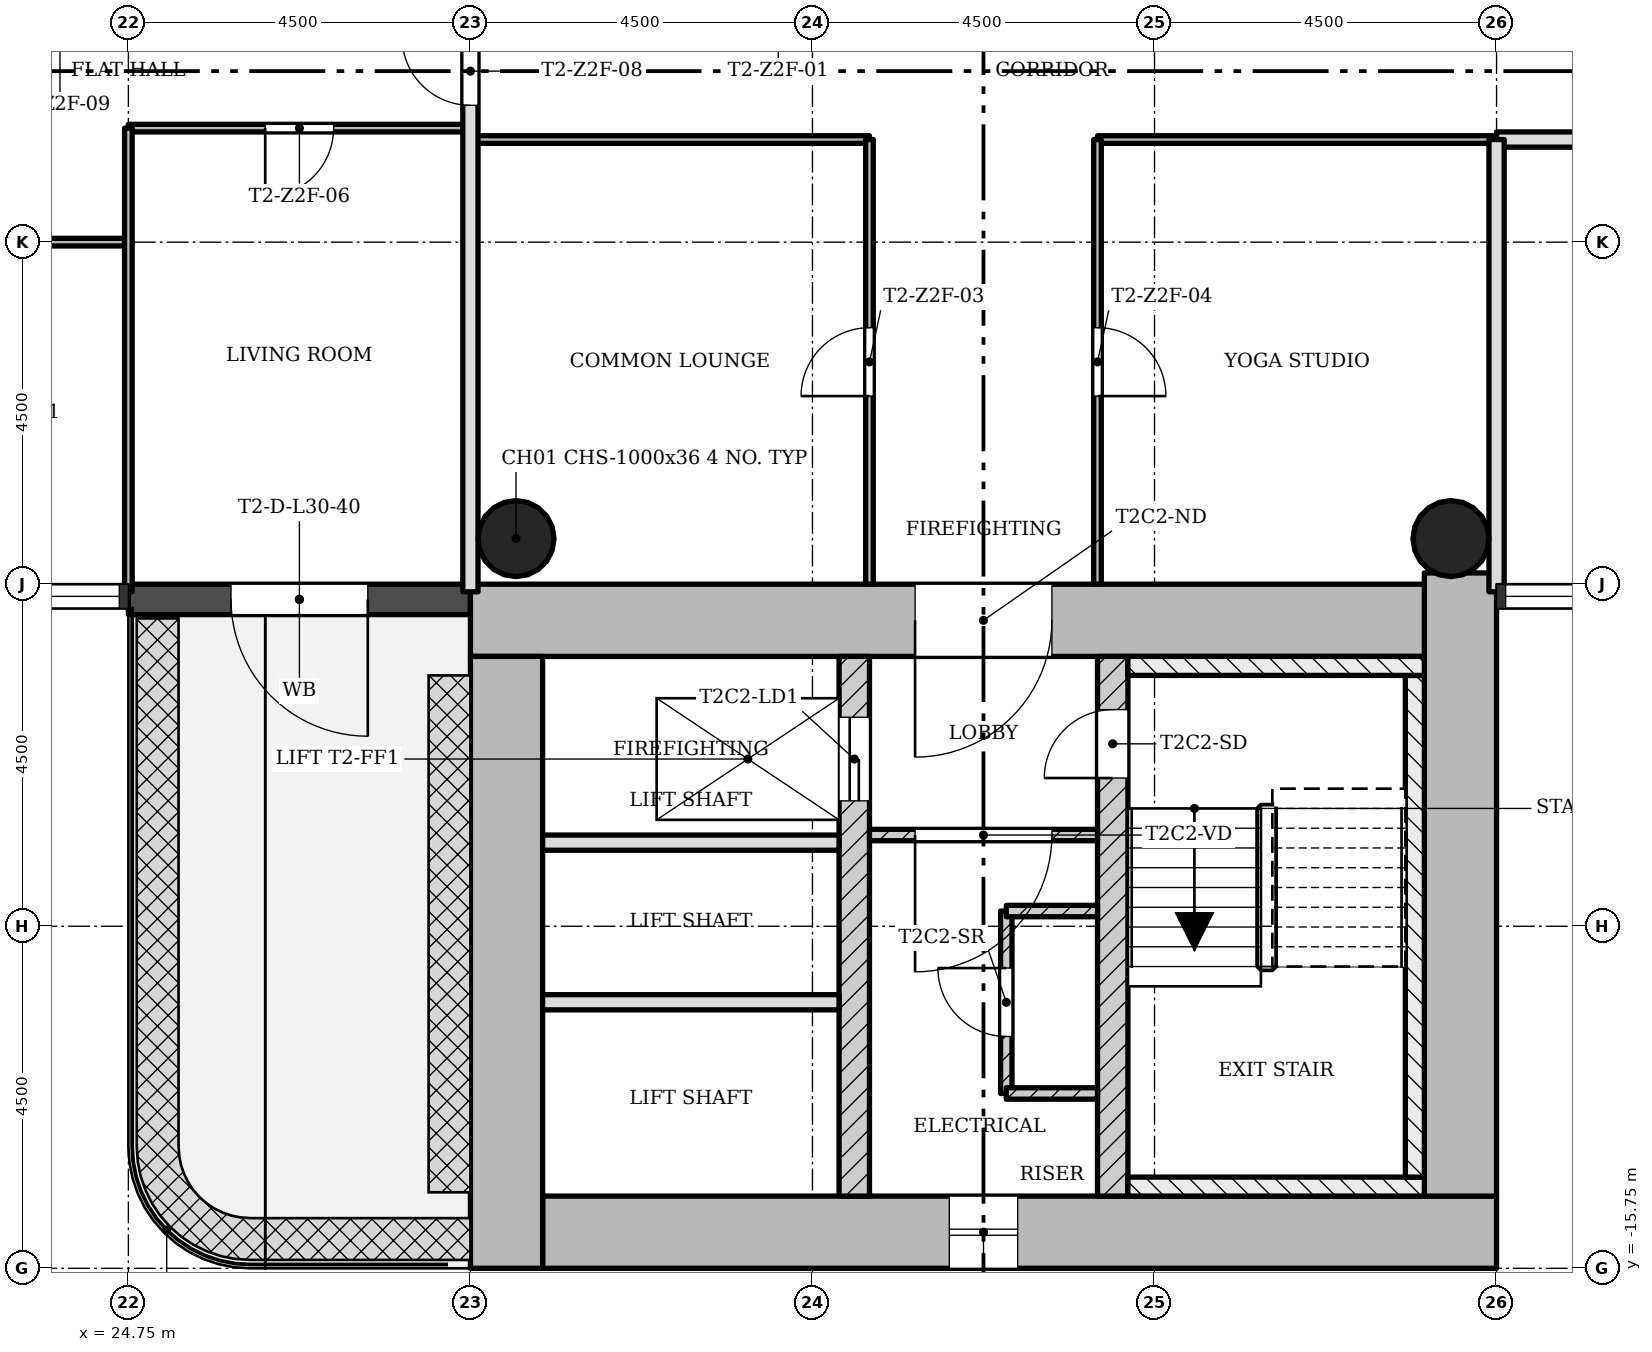
"""IFC4 building model, lengths in metres.
Left out: names, types, materials, properties, quantities, classifications, styles, units other than length and angle.
Written with IfcOpenShell. Run it as: python <this file> out.ifc"""

import sys

from ifc_helpers import new_model, si_unit, direction, frame, frame_2d, origin, origin_2d, place, context, subcontext, project, spatial, rectangle, hollow_circle, extrude, element, fill, save


model = new_model("IFC4")
c1 = context("Model", 3, precision=1e-05, world=origin(), true_north=direction((0.0, 1.0)))
c2 = subcontext(c1, "Body", "Model", "MODEL_VIEW")
j1 = project(units=[si_unit("LENGTHUNIT", "METRE"), si_unit("PLANEANGLEUNIT", "RADIAN")], contexts=[c1])
p1 = place(None, origin())
s1 = spatial("IfcSite", under=j1, at=p1, CompositionType="ELEMENT")
p2 = place(p1, origin())
s2 = spatial("IfcBuilding", under=s1, at=p2, CompositionType="ELEMENT")
p3 = place(p2, frame((0.0, 0.0, 110.6)))
s3 = spatial("IfcBuildingStorey", under=s2, at=p3, CompositionType="ELEMENT", Elevation=110.6)
p4 = place(p3, frame((30.2, -15.275, 0.0), z_axis=(0.0, 0.0, 1.0), x_axis=(1.0, 0.0, 0.0)))
e1 = element("IfcWall", 1, at=p4, inside=s3, PredefinedType="SHEAR", context=c2, shape_type="SweptSolid", body=[
    extrude(rectangle(XDim=12.55, YDim=0.95, at=frame_2d((6.275, 0.0))), origin(), (0.0, 0.0, 1.0), 3.4),
])
p5 = place(p4, frame((5.35, 0.0, 0.45)))
e2 = element("IfcOpeningElement", 2, at=p5, cuts=e1, PredefinedType="OPENING", context=c2, shape_type="SweptSolid", body=[
    extrude(rectangle(XDim=0.9, YDim=2.4, at=frame_2d((0.45, 1.2))), frame((0.0, 0.485, 0.0), z_axis=(0.0, -1.0, 0.0), x_axis=(1.0, 0.0, 0.0)), (0.0, 0.0, 1.0), 0.97),
])
p6 = place(p3, frame((42.275, -14.8, 0.0), z_axis=(0.0, 0.0, 1.0), x_axis=(0.0, 1.0, 0.0)))
e3 = element("IfcWall", 3, at=p6, inside=s3, PredefinedType="SHEAR", context=c2, shape_type="SweptSolid", body=[
    extrude(rectangle(XDim=8.198, YDim=0.95, at=frame_2d((4.099, 0.0))), origin(), (0.0, 0.0, 1.0), 3.4),
])
p7 = place(p3, frame((41.8, -7.225, 0.0), z_axis=(0.0, 0.0, 1.0), x_axis=(-1.0, 0.0, 0.0)))
e4 = element("IfcWall", 4, at=p7, inside=s3, PredefinedType="SHEAR", context=c2, shape_type="SweptSolid", body=[
    extrude(rectangle(XDim=12.55, YDim=0.95, at=frame_2d((6.275, 0.0))), origin(), (0.0, 0.0, 1.0), 3.4),
])
p8 = place(p7, frame((4.9, 0.0, 0.0)))
e5 = element("IfcOpeningElement", 5, at=p8, cuts=e4, PredefinedType="OPENING", context=c2, shape_type="SweptSolid", body=[
    extrude(rectangle(XDim=1.8, YDim=2.1, at=frame_2d((0.9, 1.05))), frame((0.0, 0.485, 0.0), z_axis=(0.0, -1.0, 0.0), x_axis=(1.0, 0.0, 0.0)), (0.0, 0.0, 1.0), 0.97),
])
p9 = place(p3, frame((29.725, -7.7, 0.0), z_axis=(0.0, 0.0, 1.0), x_axis=(0.0, -1.0, 0.0)))
e6 = element("IfcWall", 6, at=p9, inside=s3, PredefinedType="SHEAR", context=c2, shape_type="SweptSolid", body=[
    extrude(rectangle(XDim=8.05, YDim=0.95, at=frame_2d((4.025, 0.0))), origin(), (0.0, 0.0, 1.0), 3.4),
])
p10 = place(p3, frame((34.3, -14.8, 0.0), z_axis=(0.0, 0.0, 1.0), x_axis=(0.0, 1.0, 0.0)))
e7 = element("IfcWall", 7, at=p10, inside=s3, PredefinedType="SHEAR", context=c2, shape_type="SweptSolid", body=[
    extrude(rectangle(XDim=7.1, YDim=0.4, at=frame_2d((3.55, 0.0))), origin(), (0.0, 0.0, 1.0), 3.4),
])
p11 = place(p10, frame((5.2, 0.0, 0.0)))
e8 = element("IfcOpeningElement", 8, at=p11, cuts=e7, PredefinedType="OPENING", context=c2, shape_type="SweptSolid", body=[
    extrude(rectangle(XDim=1.1, YDim=2.1, at=frame_2d((0.55, 1.05))), frame((0.0, 0.21, 0.0), z_axis=(0.0, -1.0, 0.0), x_axis=(1.0, 0.0, 0.0)), (0.0, 0.0, 1.0), 0.42),
])
p12 = place(p3, frame((37.7, -14.8, 0.0), z_axis=(0.0, 0.0, 1.0), x_axis=(0.0, 1.0, 0.0)))
e9 = element("IfcWall", 9, at=p12, inside=s3, PredefinedType="SHEAR", context=c2, shape_type="SweptSolid", body=[
    extrude(rectangle(XDim=7.1, YDim=0.4, at=frame_2d((3.55, 0.0))), origin(), (0.0, 0.0, 1.0), 3.4),
])
p13 = place(p12, frame((5.5, 0.0, 0.0)))
e10 = element("IfcOpeningElement", 10, at=p13, cuts=e9, PredefinedType="OPENING", context=c2, shape_type="SweptSolid", body=[
    extrude(rectangle(XDim=0.9, YDim=2.1, at=frame_2d((0.45, 1.05))), frame((0.0, 0.21, 0.0), z_axis=(0.0, -1.0, 0.0), x_axis=(1.0, 0.0, 0.0)), (0.0, 0.0, 1.0), 0.42),
])
for number, where, z_axis, x_axis in (
    (11, (42.15, -6.15, 0.0), (0.0, 0.0, 1.0), (1.0, 0.0, 0.0)),
    (12, (29.85, -6.15, 0.0), (0.0, 0.0, 1.0), (1.0, 0.0, 0.0)),
):
    element("IfcColumn", number, at=place(p3, frame(where, z_axis=z_axis, x_axis=x_axis)), inside=s3, PredefinedType="COLUMN", context=c2, shape_type="SweptSolid", body=[
        extrude(hollow_circle(Radius=0.5, WallThickness=0.036, at=origin_2d()), origin(), (0.0, 0.0, 1.0), 3.4),
    ])
p14 = place(p3, frame((24.75, -6.95, -0.02), z_axis=(0.0, 0.0, 1.0), x_axis=(1.0, 0.0, 0.0)))
e13 = element("IfcWall", 13, at=p14, inside=s3, PredefinedType="STANDARD", context=c2, shape_type="SweptSolid", body=[
    extrude(rectangle(XDim=4.5, YDim=0.4, at=frame_2d((2.25, 0.0))), origin(), (0.0, 0.0, 1.0), 3.12),
])
p15 = place(p14, frame((1.35, 0.0, 0.02)))
e14 = element("IfcOpeningElement", 14, at=p15, cuts=e13, PredefinedType="OPENING", context=c2, shape_type="SweptSolid", body=[
    extrude(rectangle(XDim=1.8, YDim=2.1, at=frame_2d((0.9, 1.05))), frame((0.0, 0.21, 0.0), z_axis=(0.0, -1.0, 0.0), x_axis=(1.0, 0.0, 0.0)), (0.0, 0.0, 1.0), 0.42),
])
p16 = place(p3, frame((34.5, -10.05, 0.0), z_axis=(0.0, 0.0, 1.0), x_axis=(1.0, 0.0, 0.0)))
e15 = element("IfcWall", 15, at=p16, inside=s3, PredefinedType="PARTITIONING", context=c2, shape_type="SweptSolid", body=[
    extrude(rectangle(XDim=3.0, YDim=0.15, at=frame_2d((1.5, 0.0))), origin(), (0.0, 0.0, 1.0), 3.0),
])
p17 = place(p16, frame((0.6, 0.0, 0.0)))
e16 = element("IfcOpeningElement", 16, at=p17, cuts=e15, PredefinedType="OPENING", context=c2, shape_type="SweptSolid", body=[
    extrude(rectangle(XDim=1.8, YDim=2.1, at=frame_2d((0.9, 1.05))), frame((0.0, 0.085, 0.0), z_axis=(0.0, -1.0, 0.0), x_axis=(1.0, 0.0, 0.0)), (0.0, 0.0, 1.0), 0.17),
])
for number, where, z_axis, x_axis in (
    (17, (30.2, -10.15, 0.0), (0.0, 0.0, 1.0), (1.0, 0.0, 0.0)),
    (18, (30.2, -12.25, 0.0), (0.0, 0.0, 1.0), (1.0, 0.0, 0.0)),
):
    element("IfcWall", number, at=place(p3, frame(where, z_axis=z_axis, x_axis=x_axis)), inside=s3, PredefinedType="SOLIDWALL", context=c2, shape_type="SweptSolid", body=[
        extrude(rectangle(XDim=3.9, YDim=0.2, at=frame_2d((1.95, 0.0))), origin(), (0.0, 0.0, 1.0), 3.0),
    ])
p18 = place(p3, frame((36.3, -11.05, 0.0), z_axis=(0.0, 0.0, 1.0), x_axis=(0.0, -1.0, 0.0)))
e19 = element("IfcWall", 19, at=p18, inside=s3, PredefinedType="PARTITIONING", context=c2, shape_type="SweptSolid", body=[
    extrude(rectangle(XDim=2.4, YDim=0.15, at=frame_2d((1.2, 0.0))), origin(), (0.0, 0.0, 1.0), 3.0),
])
p19 = place(p18, frame((0.75, 0.0, 0.0)))
e20 = element("IfcOpeningElement", 20, at=p19, cuts=e19, PredefinedType="OPENING", context=c2, shape_type="SweptSolid", body=[
    extrude(rectangle(XDim=0.9, YDim=2.1, at=frame_2d((0.45, 1.05))), frame((0.0, 0.085, 0.0), z_axis=(0.0, -1.0, 0.0), x_axis=(1.0, 0.0, 0.0)), (0.0, 0.0, 1.0), 0.17),
])
for number, where, z_axis, x_axis in (
    (21, (36.3, -11.05, 0.0), (0.0, 0.0, 1.0), (1.0, 0.0, 0.0)),
    (22, (36.3, -13.45, 0.0), (0.0, 0.0, 1.0), (1.0, 0.0, 0.0)),
):
    element("IfcWall", number, at=place(p3, frame(where, z_axis=z_axis, x_axis=x_axis)), inside=s3, PredefinedType="PARTITIONING", context=c2, shape_type="SweptSolid", body=[
        extrude(rectangle(XDim=1.2, YDim=0.15, at=frame_2d((0.6, 0.0))), origin(), (0.0, 0.0, 1.0), 3.0),
    ])
p20 = place(p3, frame((24.75, -2.25, 0.0), z_axis=(0.0, 0.0, 1.0), x_axis=(-1.0, 0.0, 0.0)))
e23 = element("IfcWall", 23, at=p20, inside=s3, PredefinedType="PARTITIONING", context=c2, shape_type="SweptSolid", body=[
    extrude(rectangle(XDim=9.1, YDim=0.1, at=frame_2d((4.55, 0.0))), origin(), (0.0, 0.0, 1.0), 3.0),
])
p21 = place(p20, frame((3.45, 0.0, 0.0)))
e24 = element("IfcOpeningElement", 24, at=p21, cuts=e23, PredefinedType="OPENING", context=c2, shape_type="SweptSolid", body=[
    extrude(rectangle(XDim=0.9, YDim=2.1, at=frame_2d((0.45, 1.05))), frame((0.0, 0.06, 0.0), z_axis=(0.0, -1.0, 0.0), x_axis=(1.0, 0.0, 0.0)), (0.0, 0.0, 1.0), 0.12),
])
p22 = place(p20, frame((5.55, 0.0, 0.0)))
e25 = element("IfcOpeningElement", 25, at=p22, cuts=e23, PredefinedType="OPENING", context=c2, shape_type="SweptSolid", body=[
    extrude(rectangle(XDim=0.9, YDim=2.1, at=frame_2d((0.45, 1.05))), frame((0.0, 0.06, 0.0), z_axis=(0.0, -1.0, 0.0), x_axis=(1.0, 0.0, 0.0)), (0.0, 0.0, 1.0), 0.12),
])
for number, where, z_axis, x_axis in (
    (26, (42.75, -0.9, 0.0), (0.0, 0.0, 1.0), (-1.0, 0.0, 0.0)),
    (27, (34.5, -0.9, 0.0), (0.0, 0.0, 1.0), (-1.0, 0.0, 0.0)),
):
    element("IfcWall", number, at=place(p3, frame(where, z_axis=z_axis, x_axis=x_axis)), inside=s3, PredefinedType="PARTITIONING", context=c2, shape_type="SweptSolid", body=[
        extrude(rectangle(XDim=5.25, YDim=0.1, at=frame_2d((2.625, 0.0))), origin(), (0.0, 0.0, 1.0), 3.0),
    ])
p23 = place(p3, frame((44.55, -0.9, 0.0), z_axis=(0.0, 0.0, 1.0), x_axis=(-1.0, 0.0, 0.0)))
e28 = element("IfcWall", 28, at=p23, inside=s3, PredefinedType="SOLIDWALL", context=c2, shape_type="SweptSolid", body=[
    extrude(rectangle(XDim=1.8, YDim=0.2, at=frame_2d((0.9, 0.0))), origin(), (0.0, 0.0, 1.0), 3.0),
])
p24 = place(p3, frame((29.25, -0.75, 0.0), z_axis=(0.0, 0.0, 1.0), x_axis=(-1.0, 0.0, 0.0)))
e29 = element("IfcWall", 29, at=p24, inside=s3, PredefinedType="PARTITIONING", context=c2, shape_type="SweptSolid", body=[
    extrude(rectangle(XDim=4.5, YDim=0.1, at=frame_2d((2.25, 0.0))), origin(), (0.0, 0.0, 1.0), 3.0),
])
p25 = place(p24, frame((1.8, 0.0, 0.0)))
e30 = element("IfcOpeningElement", 30, at=p25, cuts=e29, PredefinedType="OPENING", context=c2, shape_type="SweptSolid", body=[
    extrude(rectangle(XDim=0.9, YDim=2.1, at=frame_2d((0.45, 1.05))), frame((0.0, 0.06, 0.0), z_axis=(0.0, -1.0, 0.0), x_axis=(1.0, 0.0, 0.0)), (0.0, 0.0, 1.0), 0.12),
])
p26 = place(p3, frame((42.75, -6.85, 0.0), z_axis=(0.0, 0.0, 1.0), x_axis=(0.0, 1.0, 0.0)))
e31 = element("IfcWall", 31, at=p26, inside=s3, PredefinedType="SOLIDWALL", context=c2, shape_type="SweptSolid", body=[
    extrude(rectangle(XDim=5.95, YDim=0.2, at=frame_2d((2.975, 0.0))), origin(), (0.0, 0.0, 1.0), 3.0),
])
p27 = place(p3, frame((37.5, -6.75, 0.0), z_axis=(0.0, 0.0, 1.0), x_axis=(0.0, 1.0, 0.0)))
e32 = element("IfcWall", 32, at=p27, inside=s3, PredefinedType="PARTITIONING", context=c2, shape_type="SweptSolid", body=[
    extrude(rectangle(XDim=5.85, YDim=0.1, at=frame_2d((2.925, 0.0))), origin(), (0.0, 0.0, 1.0), 3.0),
])
p28 = place(p27, frame((2.475, 0.0, 0.0)))
e33 = element("IfcOpeningElement", 33, at=p28, cuts=e32, PredefinedType="OPENING", context=c2, shape_type="SweptSolid", body=[
    extrude(rectangle(XDim=0.9, YDim=2.1, at=frame_2d((0.45, 1.05))), frame((0.0, 0.06, 0.0), z_axis=(0.0, -1.0, 0.0), x_axis=(1.0, 0.0, 0.0)), (0.0, 0.0, 1.0), 0.12),
])
p29 = place(p3, frame((34.5, -6.75, 0.0), z_axis=(0.0, 0.0, 1.0), x_axis=(0.0, 1.0, 0.0)))
e34 = element("IfcWall", 34, at=p29, inside=s3, PredefinedType="PARTITIONING", context=c2, shape_type="SweptSolid", body=[
    extrude(rectangle(XDim=5.85, YDim=0.1, at=frame_2d((2.925, 0.0))), origin(), (0.0, 0.0, 1.0), 3.0),
])
p30 = place(p29, frame((2.475, 0.0, 0.0)))
e35 = element("IfcOpeningElement", 35, at=p30, cuts=e34, PredefinedType="OPENING", context=c2, shape_type="SweptSolid", body=[
    extrude(rectangle(XDim=0.9, YDim=2.1, at=frame_2d((0.45, 1.05))), frame((0.0, 0.06, 0.0), z_axis=(0.0, -1.0, 0.0), x_axis=(1.0, 0.0, 0.0)), (0.0, 0.0, 1.0), 0.12),
])
p31 = place(p3, frame((29.25, -6.85, 0.0), z_axis=(0.0, 0.0, 1.0), x_axis=(0.0, 1.0, 0.0)))
e36 = element("IfcWall", 36, at=p31, inside=s3, PredefinedType="SOLIDWALL", context=c2, shape_type="SweptSolid", body=[
    extrude(rectangle(XDim=13.7, YDim=0.2, at=frame_2d((6.85, 0.0))), origin(), (0.0, 0.0, 1.0), 3.0),
])
p32 = place(p31, frame((6.4, 0.0, 0.0)))
e37 = element("IfcOpeningElement", 37, at=p32, cuts=e36, PredefinedType="OPENING", context=c2, shape_type="SweptSolid", body=[
    extrude(rectangle(XDim=0.9, YDim=2.1, at=frame_2d((0.45, 1.05))), frame((0.0, 0.11, 0.0), z_axis=(0.0, -1.0, 0.0), x_axis=(1.0, 0.0, 0.0)), (0.0, 0.0, 1.0), 0.22),
])
p33 = place(p3, frame((24.75, -6.85, 0.0), z_axis=(0.0, 0.0, 1.0), x_axis=(0.0, 1.0, 0.0)))
e38 = element("IfcWall", 38, at=p33, inside=s3, PredefinedType="PARTITIONING", context=c2, shape_type="SweptSolid", body=[
    extrude(rectangle(XDim=6.1, YDim=0.1, at=frame_2d((3.05, 0.0))), origin(), (0.0, 0.0, 1.0), 3.0),
])
p34 = place(p3, frame((37.9, -14.675, 0.0), z_axis=(0.0, 0.0, 1.0), x_axis=(1.0, 0.0, 0.0)))
e39 = element("IfcWall", 39, at=p34, inside=s3, PredefinedType="SHEAR", context=c2, shape_type="SweptSolid", body=[
    extrude(rectangle(XDim=3.9, YDim=0.25, at=frame_2d((1.95, 0.0))), origin(), (0.0, 0.0, 1.0), 3.4),
])
p35 = place(p3, frame((41.675, -7.95, 0.0), z_axis=(0.0, 0.0, 1.0), x_axis=(0.0, -1.0, 0.0)))
e40 = element("IfcWall", 40, at=p35, inside=s3, PredefinedType="SHEAR", context=c2, shape_type="SweptSolid", body=[
    extrude(rectangle(XDim=6.6, YDim=0.25, at=frame_2d((3.3, 0.0))), origin(), (0.0, 0.0, 1.0), 3.4),
])
p36 = place(p3, frame((37.9, -7.825, 0.0), z_axis=(0.0, 0.0, 1.0), x_axis=(1.0, 0.0, 0.0)))
e41 = element("IfcWall", 41, at=p36, inside=s3, PredefinedType="SHEAR", context=c2, shape_type="SweptSolid", body=[
    extrude(rectangle(XDim=3.9, YDim=0.25, at=frame_2d((1.95, 0.0))), origin(), (0.0, 0.0, 1.0), 3.4),
])
p37 = place(p15, origin())
e42 = element("IfcDoor", 42, at=p37, inside=s3, OperationType="SINGLE_SWING_RIGHT", PredefinedType="DOOR", context=c2, shape_type="SweptSolid", body=[
    extrude(rectangle(XDim=1.8, YDim=2.1, at=frame_2d((0.9, 1.05))), frame((0.0, 0.025, 0.0), z_axis=(0.0, -1.0, 0.0), x_axis=(1.0, 0.0, 0.0)), (0.0, 0.0, 1.0), 0.05),
])
fill(e14, e42)
p38 = place(p5, origin())
e43 = element("IfcWindow", 43, at=p38, inside=s3, PartitioningType="SINGLE_PANEL", PredefinedType="WINDOW", context=c2, shape_type="SweptSolid", body=[
    extrude(rectangle(XDim=0.9, YDim=2.4, at=frame_2d((0.45, 1.2))), frame((0.0, 0.03, 0.0), z_axis=(0.0, -1.0, 0.0), x_axis=(1.0, 0.0, 0.0)), (0.0, 0.0, 1.0), 0.06),
])
fill(e2, e43)
p39 = place(p17, origin())
e44 = element("IfcDoor", 44, at=p39, inside=s3, OperationType="SINGLE_SWING_LEFT", PredefinedType="DOOR", context=c2, shape_type="SweptSolid", body=[
    extrude(rectangle(XDim=1.8, YDim=2.1, at=frame_2d((0.9, 1.05))), frame((0.0, 0.025, 0.0), z_axis=(0.0, -1.0, 0.0), x_axis=(1.0, 0.0, 0.0)), (0.0, 0.0, 1.0), 0.05),
])
fill(e16, e44)
p40 = place(p19, origin())
e45 = element("IfcDoor", 45, at=p40, inside=s3, OperationType="SINGLE_SWING_LEFT", PredefinedType="DOOR", context=c2, shape_type="SweptSolid", body=[
    extrude(rectangle(XDim=0.9, YDim=2.1, at=frame_2d((0.45, 1.05))), frame((0.0, 0.025, 0.0), z_axis=(0.0, -1.0, 0.0), x_axis=(1.0, 0.0, 0.0)), (0.0, 0.0, 1.0), 0.05),
])
fill(e20, e45)
p41 = place(p30, origin())
e46 = element("IfcDoor", 46, at=p41, inside=s3, OperationType="SINGLE_SWING_RIGHT", PredefinedType="DOOR", context=c2, shape_type="SweptSolid", body=[
    extrude(rectangle(XDim=0.9, YDim=2.1, at=frame_2d((0.45, 1.05))), frame((0.0, 0.025, 0.0), z_axis=(0.0, -1.0, 0.0), x_axis=(1.0, 0.0, 0.0)), (0.0, 0.0, 1.0), 0.05),
])
fill(e35, e46)
p42 = place(p28, origin())
e47 = element("IfcDoor", 47, at=p42, inside=s3, OperationType="SINGLE_SWING_LEFT", PredefinedType="DOOR", context=c2, shape_type="SweptSolid", body=[
    extrude(rectangle(XDim=0.9, YDim=2.1, at=frame_2d((0.45, 1.05))), frame((0.0, 0.025, 0.0), z_axis=(0.0, -1.0, 0.0), x_axis=(1.0, 0.0, 0.0)), (0.0, 0.0, 1.0), 0.05),
])
fill(e33, e47)
p43 = place(p25, origin())
e48 = element("IfcDoor", 48, at=p43, inside=s3, OperationType="SINGLE_SWING_LEFT", PredefinedType="DOOR", context=c2, shape_type="SweptSolid", body=[
    extrude(rectangle(XDim=0.9, YDim=2.1, at=frame_2d((0.45, 1.05))), frame((0.0, 0.025, 0.0), z_axis=(0.0, -1.0, 0.0), x_axis=(1.0, 0.0, 0.0)), (0.0, 0.0, 1.0), 0.05),
])
fill(e30, e48)
p44 = place(p32, origin())
e49 = element("IfcDoor", 49, at=p44, inside=s3, OperationType="SINGLE_SWING_LEFT", PredefinedType="DOOR", context=c2, shape_type="SweptSolid", body=[
    extrude(rectangle(XDim=0.9, YDim=2.1, at=frame_2d((0.45, 1.05))), frame((0.0, 0.025, 0.0), z_axis=(0.0, -1.0, 0.0), x_axis=(1.0, 0.0, 0.0)), (0.0, 0.0, 1.0), 0.05),
])
fill(e37, e49)
p45 = place(p13, origin())
e50 = element("IfcDoor", 50, at=p45, inside=s3, OperationType="SINGLE_SWING_RIGHT", PredefinedType="DOOR", context=c2, shape_type="SweptSolid", body=[
    extrude(rectangle(XDim=0.9, YDim=2.1, at=frame_2d((0.45, 1.05))), frame((0.0, 0.025, 0.0), z_axis=(0.0, -1.0, 0.0), x_axis=(1.0, 0.0, 0.0)), (0.0, 0.0, 1.0), 0.05),
])
fill(e10, e50)
p46 = place(p11, origin())
e51 = element("IfcDoor", 51, at=p46, inside=s3, OperationType="SLIDING_TO_LEFT", PredefinedType="DOOR", context=c2, shape_type="SweptSolid", body=[
    extrude(rectangle(XDim=1.1, YDim=2.1, at=frame_2d((0.55, 1.05))), frame((0.0, 0.025, 0.0), z_axis=(0.0, -1.0, 0.0), x_axis=(1.0, 0.0, 0.0)), (0.0, 0.0, 1.0), 0.05),
])
fill(e8, e51)
p47 = place(p8, origin())
e52 = element("IfcDoor", 52, at=p47, inside=s3, OperationType="SINGLE_SWING_LEFT", PredefinedType="DOOR", context=c2, shape_type="SweptSolid", body=[
    extrude(rectangle(XDim=1.8, YDim=2.1, at=frame_2d((0.9, 1.05))), frame((0.0, 0.025, 0.0), z_axis=(0.0, -1.0, 0.0), x_axis=(1.0, 0.0, 0.0)), (0.0, 0.0, 1.0), 0.05),
])
fill(e5, e52)
save(model, sys.argv[1])
